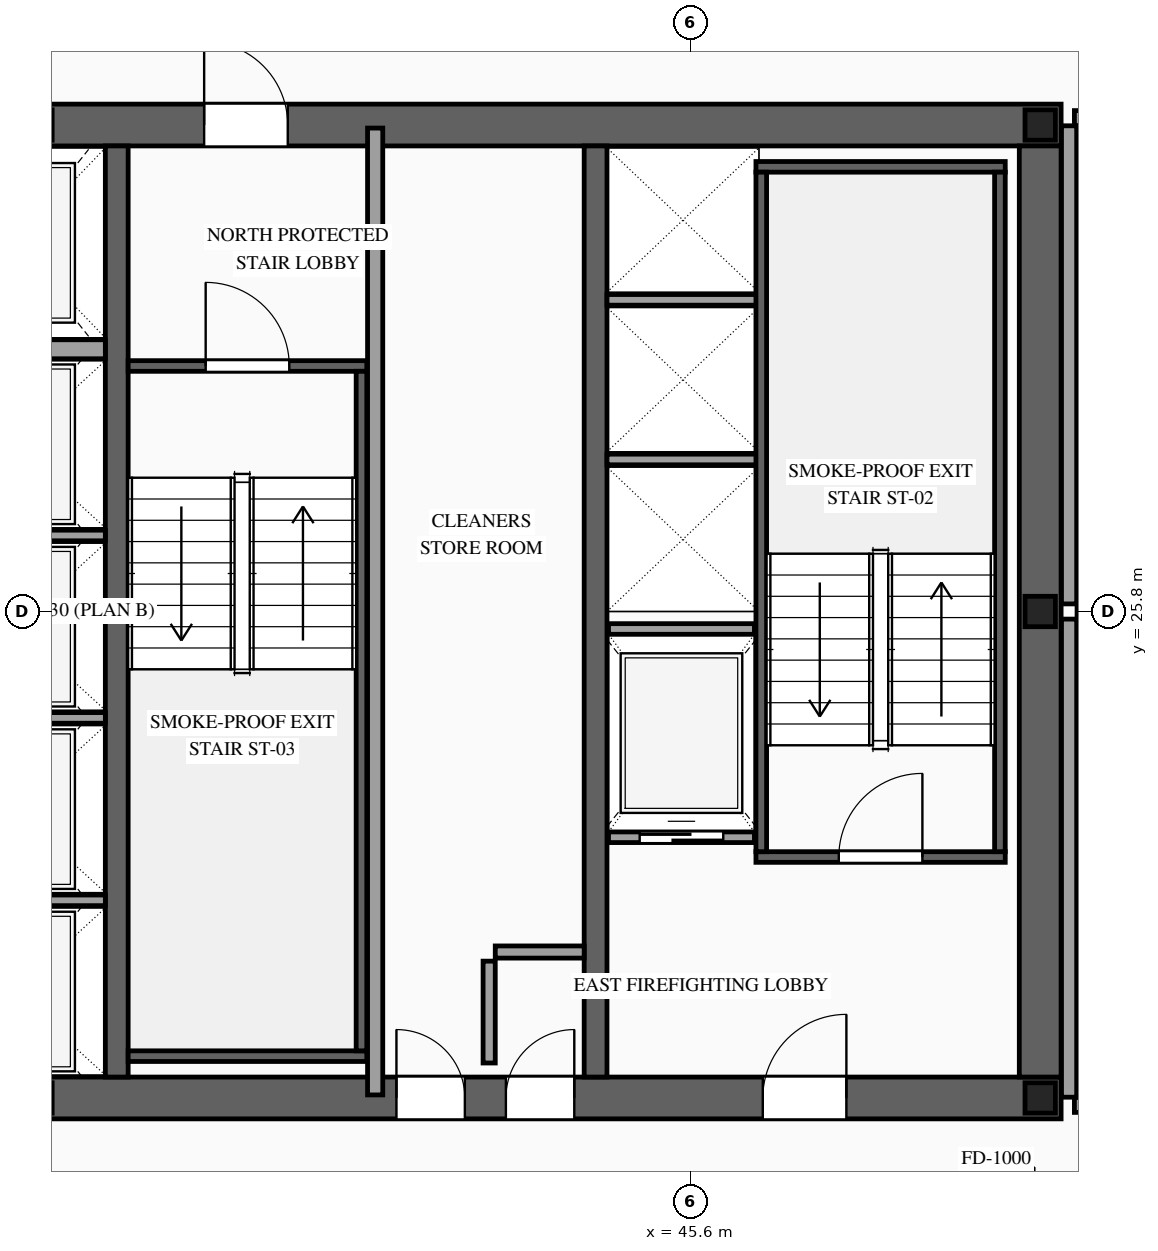
"""IFC4 building model, lengths in metres.
Left out: names, types, materials, properties, quantities, classifications, styles, units other than length and angle.
Written with IfcOpenShell. Run it as: python <this file> out.ifc"""

import sys

from ifc_helpers import new_model, si_unit, direction, frame, frame_2d, origin, origin_2d, place, context, subcontext, project, spatial, rectangle, i_section, extrude, source, transform, mapped, element, fill, save


model = new_model("IFC4")
c1 = context("Model", 3, precision=1e-05, world=origin(), true_north=direction((0.0, 1.0)))
c2 = subcontext(c1, "Body", "Model", "MODEL_VIEW")
j1 = project(units=[si_unit("LENGTHUNIT", "METRE"), si_unit("PLANEANGLEUNIT", "RADIAN")], contexts=[c1])
p1 = place(None, origin())
s1 = spatial("IfcSite", under=j1, at=p1, CompositionType="ELEMENT")
p2 = place(p1, origin())
s2 = spatial("IfcBuilding", under=s1, at=p2, CompositionType="ELEMENT")
p3 = place(p2, frame((0.0, 0.0, 248.6)))
s3 = spatial("IfcBuildingStorey", under=s2, at=p3, CompositionType="ELEMENT", Elevation=248.6)
p4 = place(p3, frame((23.525, 19.4, 0.0), z_axis=(0.0, 0.0, 1.0), x_axis=(1.0, 0.0, 0.0)))
e1 = element("IfcWall", 1, at=p4, inside=s3, PredefinedType="SHEAR", context=c2, shape_type="SweptSolid", body=[
    extrude(rectangle(XDim=26.95, YDim=0.55, at=frame_2d((13.475, 0.0))), origin(), (0.0, 0.0, 1.0), 3.5),
])
p5 = place(p4, frame((1.925, 0.0, 0.0)))
e2 = element("IfcOpeningElement", 2, at=p5, cuts=e1, PredefinedType="OPENING", context=c2, shape_type="SweptSolid", body=[
    extrude(rectangle(XDim=1.1, YDim=2.2, at=frame_2d((0.55, 1.1))), frame((0.0, 0.29, 0.0), z_axis=(0.0, -1.0, 0.0), x_axis=(1.0, 0.0, 0.0)), (0.0, 0.0, 1.0), 0.58),
])
p6 = place(p4, frame((9.825, 0.0, 0.0)))
e3 = element("IfcOpeningElement", 3, at=p6, cuts=e1, PredefinedType="OPENING", context=c2, shape_type="SweptSolid", body=[
    extrude(rectangle(XDim=1.1, YDim=2.2, at=frame_2d((0.55, 1.1))), frame((0.0, 0.29, 0.0), z_axis=(0.0, -1.0, 0.0), x_axis=(1.0, 0.0, 0.0)), (0.0, 0.0, 1.0), 0.58),
])
p7 = place(p4, frame((23.025, 0.0, 0.0)))
e4 = element("IfcOpeningElement", 4, at=p7, cuts=e1, PredefinedType="OPENING", context=c2, shape_type="SweptSolid", body=[
    extrude(rectangle(XDim=1.1, YDim=2.2, at=frame_2d((0.55, 1.1))), frame((0.0, 0.29, 0.0), z_axis=(0.0, -1.0, 0.0), x_axis=(1.0, 0.0, 0.0)), (0.0, 0.0, 1.0), 0.58),
])
p8 = place(p4, frame((19.645, 0.0, 0.0)))
e5 = element("IfcOpeningElement", 5, at=p8, cuts=e1, PredefinedType="OPENING", context=c2, shape_type="SweptSolid", body=[
    extrude(rectangle(XDim=0.9, YDim=2.15, at=frame_2d((0.45, 1.075))), frame((0.0, 0.29, 0.0), z_axis=(0.0, -1.0, 0.0), x_axis=(1.0, 0.0, 0.0)), (0.0, 0.0, 1.0), 0.58),
])
p9 = place(p4, frame((18.205, 0.0, 0.0)))
e6 = element("IfcOpeningElement", 6, at=p9, cuts=e1, PredefinedType="OPENING", context=c2, shape_type="SweptSolid", body=[
    extrude(rectangle(XDim=0.9, YDim=2.15, at=frame_2d((0.45, 1.075))), frame((0.0, 0.29, 0.0), z_axis=(0.0, -1.0, 0.0), x_axis=(1.0, 0.0, 0.0)), (0.0, 0.0, 1.0), 0.58),
])
p10 = place(p3, frame((23.525, 32.2, 0.0), z_axis=(0.0, 0.0, 1.0), x_axis=(1.0, 0.0, 0.0)))
e7 = element("IfcWall", 7, at=p10, inside=s3, PredefinedType="SHEAR", context=c2, shape_type="SweptSolid", body=[
    extrude(rectangle(XDim=26.95, YDim=0.55, at=frame_2d((13.475, 0.0))), origin(), (0.0, 0.0, 1.0), 3.5),
])
p11 = place(p10, frame((4.545, 0.0, 0.0)))
e8 = element("IfcOpeningElement", 8, at=p11, cuts=e7, PredefinedType="OPENING", context=c2, shape_type="SweptSolid", body=[
    extrude(rectangle(XDim=0.9, YDim=2.15, at=frame_2d((0.45, 1.075))), frame((0.0, 0.29, 0.0), z_axis=(0.0, -1.0, 0.0), x_axis=(1.0, 0.0, 0.0)), (0.0, 0.0, 1.0), 0.58),
])
p12 = place(p10, frame((9.825, 0.0, 0.0)))
e9 = element("IfcOpeningElement", 9, at=p12, cuts=e7, PredefinedType="OPENING", context=c2, shape_type="SweptSolid", body=[
    extrude(rectangle(XDim=1.1, YDim=2.2, at=frame_2d((0.55, 1.1))), frame((0.0, 0.29, 0.0), z_axis=(0.0, -1.0, 0.0), x_axis=(1.0, 0.0, 0.0)), (0.0, 0.0, 1.0), 0.58),
])
p13 = place(p10, frame((15.675, 0.0, 0.0)))
e10 = element("IfcOpeningElement", 10, at=p13, cuts=e7, PredefinedType="OPENING", context=c2, shape_type="SweptSolid", body=[
    extrude(rectangle(XDim=1.1, YDim=2.2, at=frame_2d((0.55, 1.1))), frame((0.0, 0.29, 0.0), z_axis=(0.0, -1.0, 0.0), x_axis=(1.0, 0.0, 0.0)), (0.0, 0.0, 1.0), 0.58),
])
m1 = source(origin(), c2, "Body", "SweptSolid", [
    extrude(rectangle(XDim=12.25, YDim=0.55, at=frame_2d((6.125, 0.0))), origin(), (0.0, 0.0, 1.0), 3.5),
])
p14 = place(p3, frame((50.2, 19.675, 0.0), z_axis=(0.0, 0.0, 1.0), x_axis=(0.0, 1.0, 0.0)))
e11 = element("IfcWall", 11, at=p14, inside=s3, PredefinedType="SHEAR", context=c2, shape_type="MappedRepresentation", body=[
    mapped(m1, transform((0.0, 0.0, 0.0), scale=1.0)),
])
m2 = source(origin(), c2, "Body", "SweptSolid", [
    extrude(rectangle(XDim=12.25, YDim=0.3, at=frame_2d((6.125, 0.0))), origin(), (0.0, 0.0, 1.0), 3.5),
])
for number, where, z_axis, x_axis in (
    (12, (38.05, 19.675, 0.0), (0.0, 0.0, 1.0), (0.0, 1.0, 0.0)),
    (13, (44.35, 19.675, 0.0), (0.0, 0.0, 1.0), (0.0, 1.0, 0.0)),
):
    element("IfcWall", number, at=place(p3, frame(where, z_axis=z_axis, x_axis=x_axis)), inside=s3, PredefinedType="SOLIDWALL", context=c2, shape_type="MappedRepresentation", body=[
        mapped(m2, transform((0.0, 0.0, 0.0), scale=1.0)),
    ])
m3 = source(origin(), c2, "Body", "SweptSolid", [
    extrude(i_section(OverallWidth=0.4, OverallDepth=0.4, WebThickness=0.013, FlangeThickness=0.021, at=origin_2d()), origin(), (0.0, 0.0, 1.0), 3.5),
])
for number, where, z_axis, x_axis in (
    (14, (50.2, 19.4, 0.0), (0.0, 0.0, 1.0), (1.0, 0.0, 0.0)),
    (15, (50.2, 25.8, 0.0), (0.0, 0.0, 1.0), (1.0, 0.0, 0.0)),
    (16, (50.2, 32.2, 0.0), (0.0, 0.0, 1.0), (1.0, 0.0, 0.0)),
):
    element("IfcColumn", number, at=place(p3, frame(where, z_axis=z_axis, x_axis=x_axis)), inside=s3, PredefinedType="COLUMN", context=c2, shape_type="MappedRepresentation", body=[
        mapped(m3, transform((0.0, 0.0, 0.0), scale=1.0)),
    ])
p15 = place(p3, frame((44.52, 22.83, 0.0), z_axis=(0.0, 0.0, 1.0), x_axis=(1.0, 0.0, 0.0)))
e17 = element("IfcWall", 17, at=p15, inside=s3, PredefinedType="SOLIDWALL", context=c2, shape_type="SweptSolid", body=[
    extrude(rectangle(XDim=1.92, YDim=0.14, at=frame_2d((0.96, 0.0))), origin(), (0.0, 0.0, 1.0), 3.28),
])
p16 = place(p15, frame((0.41, 0.0, 0.0)))
e18 = element("IfcOpeningElement", 18, at=p16, cuts=e17, PredefinedType="OPENING", context=c2, shape_type="SweptSolid", body=[
    extrude(rectangle(XDim=1.1, YDim=2.2, at=frame_2d((0.55, 1.1))), frame((0.0, 0.085, 0.0), z_axis=(0.0, -1.0, 0.0), x_axis=(1.0, 0.0, 0.0)), (0.0, 0.0, 1.0), 0.17),
])
m4 = source(origin(), c2, "Body", "SweptSolid", [
    extrude(rectangle(XDim=1.92, YDim=0.14, at=frame_2d((0.96, 0.0))), origin(), (0.0, 0.0, 1.0), 3.28),
])
p17 = place(p3, frame((44.52, 25.57, 0.0), z_axis=(0.0, 0.0, 1.0), x_axis=(1.0, 0.0, 0.0)))
e19 = element("IfcWall", 19, at=p17, inside=s3, PredefinedType="SOLIDWALL", context=c2, shape_type="MappedRepresentation", body=[
    mapped(m4, transform((0.0, 0.0, 0.0), scale=1.0)),
])
m5 = source(origin(), c2, "Body", "SweptSolid", [
    extrude(rectangle(XDim=2.4, YDim=0.14, at=frame_2d((1.2, 0.0))), origin(), (0.0, 0.0, 1.0), 3.28),
])
for number, where, z_axis, x_axis in (
    (20, (35.5, 22.0, 0.0), (0.0, 0.0, 1.0), (1.0, 0.0, 0.0)),
    (21, (35.5, 24.4, 0.0), (0.0, 0.0, 1.0), (1.0, 0.0, 0.0)),
    (22, (35.5, 26.8, 0.0), (0.0, 0.0, 1.0), (1.0, 0.0, 0.0)),
):
    element("IfcWall", number, at=place(p3, frame(where, z_axis=z_axis, x_axis=x_axis)), inside=s3, PredefinedType="SOLIDWALL", context=c2, shape_type="MappedRepresentation", body=[
        mapped(m5, transform((0.0, 0.0, 0.0), scale=1.0)),
    ])
m6 = source(origin(), c2, "Body", "SweptSolid", [
    extrude(rectangle(XDim=2.4, YDim=0.25, at=frame_2d((1.2, 0.0))), origin(), (0.0, 0.0, 1.0), 3.28),
])
p18 = place(p3, frame((35.5, 29.25, 0.0), z_axis=(0.0, 0.0, 1.0), x_axis=(1.0, 0.0, 0.0)))
e23 = element("IfcWall", 23, at=p18, inside=s3, PredefinedType="SOLIDWALL", context=c2, shape_type="MappedRepresentation", body=[
    mapped(m6, transform((0.0, 0.0, 0.0), scale=1.0)),
])
m7 = source(origin(), c2, "Body", "SweptSolid", [
    extrude(rectangle(XDim=2.0, YDim=0.14, at=frame_2d((1.0, 0.0))), origin(), (0.0, 0.0, 1.0), 3.28),
])
for number, where, z_axis, x_axis in (
    (24, (44.5, 27.8, 0.0), (0.0, 0.0, 1.0), (1.0, 0.0, 0.0)),
    (25, (44.5, 29.9, 0.0), (0.0, 0.0, 1.0), (1.0, 0.0, 0.0)),
):
    element("IfcWall", number, at=place(p3, frame(where, z_axis=z_axis, x_axis=x_axis)), inside=s3, PredefinedType="SOLIDWALL", context=c2, shape_type="MappedRepresentation", body=[
        mapped(m7, transform((0.0, 0.0, 0.0), scale=1.0)),
    ])
p19 = place(p3, frame((46.46, 22.57, 0.0), z_axis=(0.0, 0.0, 1.0), x_axis=(1.0, 0.0, 0.0)))
e26 = element("IfcWall", 26, at=p19, inside=s3, PredefinedType="SOLIDWALL", context=c2, shape_type="SweptSolid", body=[
    extrude(rectangle(XDim=3.28, YDim=0.14, at=frame_2d((1.64, 0.0))), origin(), (0.0, 0.0, 1.0), 3.28),
])
p20 = place(p19, frame((1.09, 0.0, 0.0)))
e27 = element("IfcOpeningElement", 27, at=p20, cuts=e26, PredefinedType="OPENING", context=c2, shape_type="SweptSolid", body=[
    extrude(rectangle(XDim=1.1, YDim=2.2, at=frame_2d((0.55, 1.1))), frame((0.0, 0.085, 0.0), z_axis=(0.0, -1.0, 0.0), x_axis=(1.0, 0.0, 0.0)), (0.0, 0.0, 1.0), 0.17),
])
m8 = source(origin(), c2, "Body", "SweptSolid", [
    extrude(rectangle(XDim=3.28, YDim=0.14, at=frame_2d((1.64, 0.0))), origin(), (0.0, 0.0, 1.0), 3.28),
])
p21 = place(p3, frame((46.46, 31.65, 0.0), z_axis=(0.0, 0.0, 1.0), x_axis=(1.0, 0.0, 0.0)))
e28 = element("IfcWall", 28, at=p21, inside=s3, PredefinedType="SOLIDWALL", context=c2, shape_type="MappedRepresentation", body=[
    mapped(m8, transform((0.0, 0.0, 0.0), scale=1.0)),
])
m9 = source(origin(), c2, "Body", "SweptSolid", [
    extrude(rectangle(XDim=8.94, YDim=0.14, at=frame_2d((4.47, 0.0))), origin(), (0.0, 0.0, 1.0), 3.28),
])
for number, where, z_axis, x_axis in (
    (29, (46.53, 22.64, 0.0), (0.0, 0.0, 1.0), (0.0, 1.0, 0.0)),
    (30, (49.67, 22.64, 0.0), (0.0, 0.0, 1.0), (0.0, 1.0, 0.0)),
):
    element("IfcWall", number, at=place(p3, frame(where, z_axis=z_axis, x_axis=x_axis)), inside=s3, PredefinedType="SOLIDWALL", context=c2, shape_type="MappedRepresentation", body=[
        mapped(m9, transform((0.0, 0.0, 0.0), scale=1.0)),
    ])
p22 = place(p3, frame((38.2, 29.03, 0.0), z_axis=(0.0, 0.0, 1.0), x_axis=(1.0, 0.0, 0.0)))
e31 = element("IfcWall", 31, at=p22, inside=s3, PredefinedType="SOLIDWALL", context=c2, shape_type="SweptSolid", body=[
    extrude(rectangle(XDim=3.14, YDim=0.14, at=frame_2d((1.57, 0.0))), origin(), (0.0, 0.0, 1.0), 3.28),
])
p23 = place(p22, frame((1.02, 0.0, 0.0)))
e32 = element("IfcOpeningElement", 32, at=p23, cuts=e31, PredefinedType="OPENING", context=c2, shape_type="SweptSolid", body=[
    extrude(rectangle(XDim=1.1, YDim=2.2, at=frame_2d((0.55, 1.1))), frame((0.0, 0.085, 0.0), z_axis=(0.0, -1.0, 0.0), x_axis=(1.0, 0.0, 0.0)), (0.0, 0.0, 1.0), 0.17),
])
m10 = source(origin(), c2, "Body", "SweptSolid", [
    extrude(rectangle(XDim=3.14, YDim=0.14, at=frame_2d((1.57, 0.0))), origin(), (0.0, 0.0, 1.0), 3.28),
])
p24 = place(p3, frame((38.2, 19.95, 0.0), z_axis=(0.0, 0.0, 1.0), x_axis=(1.0, 0.0, 0.0)))
e33 = element("IfcWall", 33, at=p24, inside=s3, PredefinedType="SOLIDWALL", context=c2, shape_type="MappedRepresentation", body=[
    mapped(m10, transform((0.0, 0.0, 0.0), scale=1.0)),
])
m11 = source(origin(), c2, "Body", "SweptSolid", [
    extrude(rectangle(XDim=8.94, YDim=0.14, at=frame_2d((4.47, 0.0))), origin(), (0.0, 0.0, 1.0), 3.28),
])
p25 = place(p3, frame((41.27, 20.02, 0.0), z_axis=(0.0, 0.0, 1.0), x_axis=(0.0, 1.0, 0.0)))
e34 = element("IfcWall", 34, at=p25, inside=s3, PredefinedType="SOLIDWALL", context=c2, shape_type="MappedRepresentation", body=[
    mapped(m11, transform((0.0, 0.0, 0.0), scale=1.0)),
])
m12 = source(origin(), c2, "Body", "SweptSolid", [
    extrude(rectangle(XDim=1.34, YDim=0.16, at=frame_2d((0.67, 0.0))), origin(), (0.0, 0.0, 1.0), 3.28),
])
p26 = place(p3, frame((42.95, 19.86, 0.0), z_axis=(0.0, 0.0, 1.0), x_axis=(0.0, 1.0, 0.0)))
e35 = element("IfcWall", 35, at=p26, inside=s3, PredefinedType="PARTITIONING", context=c2, shape_type="MappedRepresentation", body=[
    mapped(m12, transform((0.0, 0.0, 0.0), scale=1.0)),
])
m13 = source(origin(), c2, "Body", "SweptSolid", [
    extrude(rectangle(XDim=1.17, YDim=0.16, at=frame_2d((0.585, 0.0))), origin(), (0.0, 0.0, 1.0), 3.28),
])
p27 = place(p3, frame((43.03, 21.32, 0.0), z_axis=(0.0, 0.0, 1.0), x_axis=(1.0, 0.0, 0.0)))
e36 = element("IfcWall", 36, at=p27, inside=s3, PredefinedType="PARTITIONING", context=c2, shape_type="MappedRepresentation", body=[
    mapped(m13, transform((0.0, 0.0, 0.0), scale=1.0)),
])
m14 = source(origin(), c2, "Body", "SweptSolid", [
    extrude(rectangle(XDim=12.72, YDim=0.2, at=frame_2d((6.36, 0.0))), origin(), (0.0, 0.0, 1.0), 3.28),
])
p28 = place(p3, frame((41.45, 19.44, 0.0), z_axis=(0.0, 0.0, 1.0), x_axis=(0.0, 1.0, 0.0)))
e37 = element("IfcWall", 37, at=p28, inside=s3, PredefinedType="PARTITIONING", context=c2, shape_type="MappedRepresentation", body=[
    mapped(m14, transform((0.0, 0.0, 0.0), scale=1.0)),
])
p29 = place(p3, frame((50.65, 19.31, 0.0), z_axis=(0.0, 0.0, 1.0), x_axis=(1.0, 0.0, 0.0)))
e38 = element("IfcWall", 38, at=p29, inside=s3, PredefinedType="PARTITIONING", context=c2, shape_type="SweptSolid", body=[
    extrude(rectangle(XDim=6.8, YDim=0.2, at=frame_2d((3.4, 0.0))), origin(), (0.0, 0.0, 1.0), 2.825),
])
p30 = place(p29, frame((2.8, 0.0, 0.0)))
e39 = element("IfcOpeningElement", 39, at=p30, cuts=e38, PredefinedType="OPENING", context=c2, shape_type="SweptSolid", body=[
    extrude(rectangle(XDim=1.0, YDim=2.2, at=frame_2d((0.5, 1.1))), frame((0.0, 0.115, 0.0), z_axis=(0.0, -1.0, 0.0), x_axis=(1.0, 0.0, 0.0)), (0.0, 0.0, 1.0), 0.23),
])
m15 = source(origin(), c2, "Body", "SweptSolid", [
    extrude(rectangle(XDim=6.765, YDim=0.2, at=frame_2d((3.382, 0.0))), origin(), (0.0, 0.0, 1.0), 2.787),
])
p31 = place(p3, frame((50.685, 25.8, 0.0), z_axis=(0.0, 0.0, 1.0), x_axis=(1.0, 0.0, 0.0)))
e40 = element("IfcWall", 40, at=p31, inside=s3, PredefinedType="PARTITIONING", context=c2, shape_type="MappedRepresentation", body=[
    mapped(m15, transform((0.0, 0.0, 0.0), scale=1.0)),
])
m16 = source(origin(), c2, "Body", "SweptSolid", [
    extrude(rectangle(XDim=6.29, YDim=0.2, at=frame_2d((3.145, 0.0))), origin(), (0.0, 0.0, 1.0), 3.28),
])
p32 = place(p3, frame((50.58, 19.41, 0.0), z_axis=(0.0, 0.0, 1.0), x_axis=(0.0, 1.0, 0.0)))
e41 = element("IfcWall", 41, at=p32, inside=s3, PredefinedType="PARTITIONING", context=c2, shape_type="MappedRepresentation", body=[
    mapped(m16, transform((0.0, 0.0, 0.0), scale=1.0)),
])
p33 = place(p3, frame((50.65, 32.29, 0.0), z_axis=(0.0, 0.0, 1.0), x_axis=(1.0, 0.0, 0.0)))
e42 = element("IfcWall", 42, at=p33, inside=s3, PredefinedType="PARTITIONING", context=c2, shape_type="SweptSolid", body=[
    extrude(rectangle(XDim=6.8, YDim=0.2, at=frame_2d((3.4, 0.0))), origin(), (0.0, 0.0, 1.0), 2.825),
])
p34 = place(p33, frame((2.835, 0.0, 0.0)))
e43 = element("IfcOpeningElement", 43, at=p34, cuts=e42, PredefinedType="OPENING", context=c2, shape_type="SweptSolid", body=[
    extrude(rectangle(XDim=1.0, YDim=2.2, at=frame_2d((0.5, 1.1))), frame((0.0, 0.115, 0.0), z_axis=(0.0, -1.0, 0.0), x_axis=(1.0, 0.0, 0.0)), (0.0, 0.0, 1.0), 0.23),
])
p35 = place(p3, frame((50.58, 25.9, 0.0), z_axis=(0.0, 0.0, 1.0), x_axis=(0.0, 1.0, 0.0)))
e44 = element("IfcWall", 44, at=p35, inside=s3, PredefinedType="PARTITIONING", context=c2, shape_type="MappedRepresentation", body=[
    mapped(m16, transform((0.0, 0.0, 0.0), scale=1.0)),
])
m17 = source(origin(), c2, "Body", "SweptSolid", [
    extrude(rectangle(XDim=1.1, YDim=2.2, at=frame_2d((0.55, 1.1))), frame((0.0, 0.025, 0.0), z_axis=(0.0, -1.0, 0.0), x_axis=(1.0, 0.0, 0.0)), (0.0, 0.0, 1.0), 0.05),
])
p36 = place(p16, origin())
e45 = element("IfcDoor", 45, at=p36, inside=s3, OperationType="SLIDING_TO_RIGHT", PredefinedType="DOOR", context=c2, shape_type="MappedRepresentation", body=[
    mapped(m17, transform((0.0, 0.0, 0.0), scale=1.0)),
])
fill(e18, e45)
m18 = source(origin(), c2, "Body", "SweptSolid", [
    extrude(rectangle(XDim=1.1, YDim=2.2, at=frame_2d((0.55, 1.1))), frame((0.0, 0.025, 0.0), z_axis=(0.0, -1.0, 0.0), x_axis=(1.0, 0.0, 0.0)), (0.0, 0.0, 1.0), 0.05),
])
p37 = place(p20, origin())
e46 = element("IfcDoor", 46, at=p37, inside=s3, OperationType="SINGLE_SWING_RIGHT", PredefinedType="DOOR", context=c2, shape_type="MappedRepresentation", body=[
    mapped(m18, transform((0.0, 0.0, 0.0), scale=1.0)),
])
fill(e27, e46)
p38 = place(p23, origin())
e47 = element("IfcDoor", 47, at=p38, inside=s3, OperationType="SINGLE_SWING_LEFT", PredefinedType="DOOR", context=c2, shape_type="MappedRepresentation", body=[
    mapped(m18, transform((0.0, 0.0, 0.0), scale=1.0)),
])
fill(e32, e47)
p39 = place(p7, origin())
e48 = element("IfcDoor", 48, at=p39, inside=s3, OperationType="SINGLE_SWING_RIGHT", PredefinedType="DOOR", context=c2, shape_type="MappedRepresentation", body=[
    mapped(m18, transform((0.0, 0.0, 0.0), scale=1.0)),
])
fill(e4, e48)
p40 = place(p13, origin())
e49 = element("IfcDoor", 49, at=p40, inside=s3, OperationType="SINGLE_SWING_LEFT", PredefinedType="DOOR", context=c2, shape_type="MappedRepresentation", body=[
    mapped(m18, transform((0.0, 0.0, 0.0), scale=1.0)),
])
fill(e10, e49)
m19 = source(origin(), c2, "Body", "SweptSolid", [
    extrude(rectangle(XDim=0.9, YDim=2.15, at=frame_2d((0.45, 1.075))), frame((0.0, 0.025, 0.0), z_axis=(0.0, -1.0, 0.0), x_axis=(1.0, 0.0, 0.0)), (0.0, 0.0, 1.0), 0.05),
])
p41 = place(p8, origin())
e50 = element("IfcDoor", 50, at=p41, inside=s3, OperationType="SINGLE_SWING_RIGHT", PredefinedType="DOOR", context=c2, shape_type="MappedRepresentation", body=[
    mapped(m19, transform((0.0, 0.0, 0.0), scale=1.0)),
])
fill(e5, e50)
p42 = place(p9, origin())
e51 = element("IfcDoor", 51, at=p42, inside=s3, OperationType="SINGLE_SWING_LEFT", PredefinedType="DOOR", context=c2, shape_type="MappedRepresentation", body=[
    mapped(m19, transform((0.0, 0.0, 0.0), scale=1.0)),
])
fill(e6, e51)
save(model, sys.argv[1])
